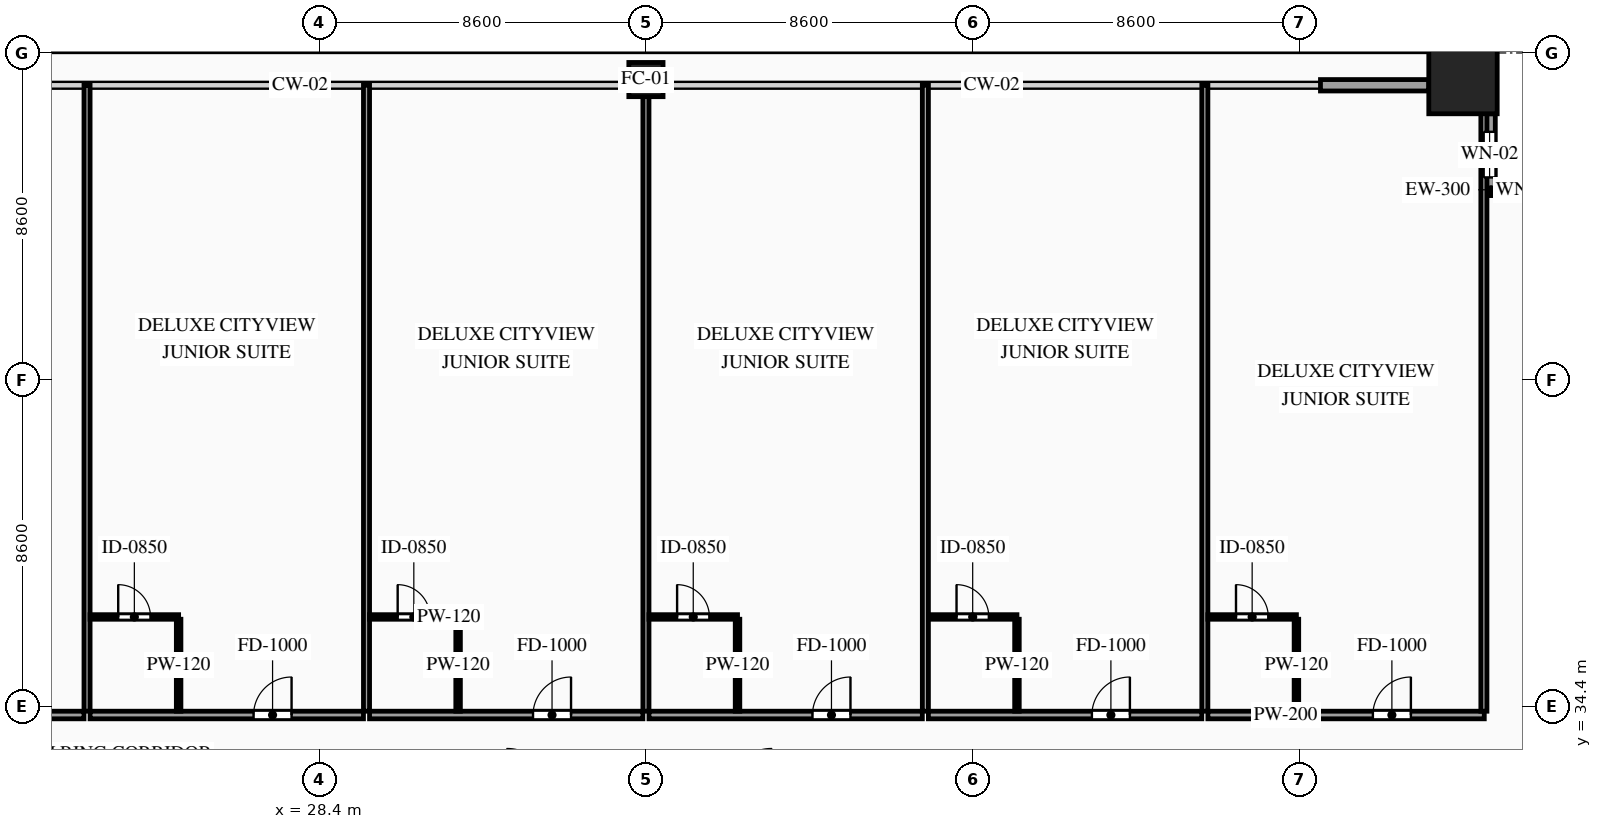
"""IFC4 building model, lengths in metres.
Left out: names, types, materials, properties, quantities, classifications, styles, units other than length and angle.
Written with IfcOpenShell. Run it as: python <this file> out.ifc"""

import sys

from ifc_helpers import new_model, si_unit, direction, frame, frame_2d, origin, origin_2d, place, context, subcontext, project, spatial, rectangle, hollow_rectangle, extrude, source, transform, mapped, element, fill, save


model = new_model("IFC4")
c1 = context("Model", 3, precision=1e-05, world=origin(), true_north=direction((0.0, 1.0)))
c2 = subcontext(c1, "Body", "Model", "MODEL_VIEW")
j1 = project(units=[si_unit("LENGTHUNIT", "METRE"), si_unit("PLANEANGLEUNIT", "RADIAN")], contexts=[c1])
p1 = place(None, origin())
s1 = spatial("IfcSite", under=j1, at=p1, CompositionType="ELEMENT")
p2 = place(p1, origin())
s2 = spatial("IfcBuilding", under=s1, at=p2, CompositionType="ELEMENT")
p3 = place(p2, frame((0.0, 0.0, 30.6)))
s3 = spatial("IfcBuildingStorey", under=s2, at=p3, CompositionType="ELEMENT", Elevation=30.6)
m1 = source(origin(), c2, "Body", "SweptSolid", [
    extrude(hollow_rectangle(XDim=0.9, YDim=0.9, WallThickness=0.042, at=origin_2d()), origin(), (0.0, 0.0, 1.0), 3.6),
])
p4 = place(p3, frame((37.0, 50.9, 0.0), z_axis=(0.0, 0.0, 1.0), x_axis=(1.0, 0.0, 0.0)))
e1 = element("IfcColumn", 1, at=p4, inside=s3, PredefinedType="COLUMN", context=c2, shape_type="MappedRepresentation", body=[
    mapped(m1, transform((0.0, 0.0, 0.0), scale=1.0)),
])
m2 = source(origin(), c2, "Body", "SweptSolid", [
    extrude(hollow_rectangle(XDim=1.8, YDim=1.8, WallThickness=0.08, at=origin_2d()), origin(), (0.0, 0.0, 1.0), 3.6),
])
p5 = place(p3, frame((58.5, 50.9, 0.0), z_axis=(0.0, 0.0, 1.0), x_axis=(1.0, 0.0, 0.0)))
e2 = element("IfcColumn", 2, at=p5, inside=s3, PredefinedType="COLUMN", context=c2, shape_type="MappedRepresentation", body=[
    mapped(m2, transform((0.0, 0.0, 0.0), scale=1.0)),
])
p6 = place(p3, frame((61.2, 48.0, 0.0), z_axis=(0.0, 0.0, 1.0), x_axis=(-1.0, 0.0, 0.0)))
e3 = element("IfcWall", 3, at=p6, inside=s3, PredefinedType="SOLIDWALL", context=c2, shape_type="SweptSolid", body=[
    extrude(rectangle(XDim=2.15, YDim=0.3, at=frame_2d((1.075, 0.0))), origin(), (0.0, 0.0, 1.0), 3.38),
])
p7 = place(p6, frame((0.625, 0.0, 0.85)))
e4 = element("IfcOpeningElement", 4, at=p7, cuts=e3, PredefinedType="OPENING", context=c2, shape_type="SweptSolid", body=[
    extrude(rectangle(XDim=0.9, YDim=1.5, at=frame_2d((0.45, 0.75))), frame((0.0, 0.165, 0.0), z_axis=(0.0, -1.0, 0.0), x_axis=(1.0, 0.0, 0.0)), (0.0, 0.0, 1.0), 0.33),
])
p8 = place(p3, frame((59.2, 47.85, 0.0), z_axis=(0.0, 0.0, 1.0), x_axis=(0.0, 1.0, 0.0)))
e5 = element("IfcWall", 5, at=p8, inside=s3, PredefinedType="SOLIDWALL", context=c2, shape_type="SweptSolid", body=[
    extrude(rectangle(XDim=2.15, YDim=0.3, at=frame_2d((1.075, 0.0))), origin(), (0.0, 0.0, 1.0), 3.38),
])
p9 = place(p8, frame((0.475, 0.0, 0.85)))
e6 = element("IfcOpeningElement", 6, at=p9, cuts=e5, PredefinedType="OPENING", context=c2, shape_type="SweptSolid", body=[
    extrude(rectangle(XDim=1.2, YDim=2.1, at=frame_2d((0.6, 1.05))), frame((0.0, 0.165, 0.0), z_axis=(0.0, -1.0, 0.0), x_axis=(1.0, 0.0, 0.0)), (0.0, 0.0, 1.0), 0.33),
])
m3 = source(origin(), c2, "Body", "SweptSolid", [
    extrude(rectangle(XDim=2.85, YDim=0.3, at=frame_2d((1.425, 0.0))), origin(), (0.0, 0.0, 1.0), 2.775),
])
p10 = place(p3, frame((54.75, 50.75, 0.0), z_axis=(0.0, 0.0, 1.0), x_axis=(1.0, 0.0, 0.0)))
e7 = element("IfcWall", 7, at=p10, inside=s3, PredefinedType="SOLIDWALL", context=c2, shape_type="MappedRepresentation", body=[
    mapped(m3, transform((0.0, 0.0, 0.0), scale=1.0)),
])
p11 = place(p3, frame((14.94, 34.18, 0.0), z_axis=(0.0, 0.0, 1.0), x_axis=(1.0, 0.0, 0.0)))
e8 = element("IfcWall", 8, at=p11, inside=s3, PredefinedType="PARTITIONING", context=c2, shape_type="SweptSolid", body=[
    extrude(rectangle(XDim=7.273, YDim=0.2, at=frame_2d((3.636, 0.0))), origin(), (0.0, 0.0, 1.0), 3.38),
])
p12 = place(p11, frame((4.342, 0.0, 0.0)))
e9 = element("IfcOpeningElement", 9, at=p12, cuts=e8, PredefinedType="OPENING", context=c2, shape_type="SweptSolid", body=[
    extrude(rectangle(XDim=1.0, YDim=2.2, at=frame_2d((0.5, 1.1))), frame((0.0, 0.115, 0.0), z_axis=(0.0, -1.0, 0.0), x_axis=(1.0, 0.0, 0.0)), (0.0, 0.0, 1.0), 0.23),
])
m4 = source(origin(), c2, "Body", "SweptSolid", [
    extrude(rectangle(XDim=16.47, YDim=0.16, at=frame_2d((8.235, 0.0))), origin(), (0.0, 0.0, 1.0), 3.38),
])
p13 = place(p3, frame((22.293, 34.28, 0.0), z_axis=(0.0, 0.0, 1.0), x_axis=(0.0, 1.0, 0.0)))
e10 = element("IfcWall", 10, at=p13, inside=s3, PredefinedType="PARTITIONING", context=c2, shape_type="MappedRepresentation", body=[
    mapped(m4, transform((0.0, 0.0, 0.0), scale=1.0)),
])
p14 = place(p3, frame((22.373, 34.18, 0.0), z_axis=(0.0, 0.0, 1.0), x_axis=(1.0, 0.0, 0.0)))
e11 = element("IfcWall", 11, at=p14, inside=s3, PredefinedType="PARTITIONING", context=c2, shape_type="SweptSolid", body=[
    extrude(rectangle(XDim=7.194, YDim=0.2, at=frame_2d((3.597, 0.0))), origin(), (0.0, 0.0, 1.0), 3.38),
])
p15 = place(p14, frame((4.302, 0.0, 0.0)))
e12 = element("IfcOpeningElement", 12, at=p15, cuts=e11, PredefinedType="OPENING", context=c2, shape_type="SweptSolid", body=[
    extrude(rectangle(XDim=1.0, YDim=2.2, at=frame_2d((0.5, 1.1))), frame((0.0, 0.115, 0.0), z_axis=(0.0, -1.0, 0.0), x_axis=(1.0, 0.0, 0.0)), (0.0, 0.0, 1.0), 0.23),
])
p16 = place(p3, frame((29.647, 34.28, 0.0), z_axis=(0.0, 0.0, 1.0), x_axis=(0.0, 1.0, 0.0)))
e13 = element("IfcWall", 13, at=p16, inside=s3, PredefinedType="PARTITIONING", context=c2, shape_type="MappedRepresentation", body=[
    mapped(m4, transform((0.0, 0.0, 0.0), scale=1.0)),
])
p17 = place(p3, frame((22.373, 36.76, 0.0), z_axis=(0.0, 0.0, 1.0), x_axis=(1.0, 0.0, 0.0)))
e14 = element("IfcWall", 14, at=p17, inside=s3, PredefinedType="PARTITIONING", context=c2, shape_type="SweptSolid", body=[
    extrude(rectangle(XDim=2.33, YDim=0.12, at=frame_2d((1.165, 0.0))), origin(), (0.0, 0.0, 1.0), 3.38),
])
p18 = place(p17, frame((0.74, 0.0, 0.0)))
e15 = element("IfcOpeningElement", 15, at=p18, cuts=e14, PredefinedType="OPENING", context=c2, shape_type="SweptSolid", body=[
    extrude(rectangle(XDim=0.85, YDim=2.1, at=frame_2d((0.425, 1.05))), frame((0.0, 0.075, 0.0), z_axis=(0.0, -1.0, 0.0), x_axis=(1.0, 0.0, 0.0)), (0.0, 0.0, 1.0), 0.15),
])
m5 = source(origin(), c2, "Body", "SweptSolid", [
    extrude(rectangle(XDim=2.42, YDim=0.12, at=frame_2d((1.21, 0.0))), origin(), (0.0, 0.0, 1.0), 3.38),
])
p19 = place(p3, frame((24.703, 34.28, 0.0), z_axis=(0.0, 0.0, 1.0), x_axis=(0.0, 1.0, 0.0)))
e16 = element("IfcWall", 16, at=p19, inside=s3, PredefinedType="PARTITIONING", context=c2, shape_type="MappedRepresentation", body=[
    mapped(m5, transform((0.0, 0.0, 0.0), scale=1.0)),
])
p20 = place(p3, frame((29.727, 34.18, 0.0), z_axis=(0.0, 0.0, 1.0), x_axis=(1.0, 0.0, 0.0)))
e17 = element("IfcWall", 17, at=p20, inside=s3, PredefinedType="PARTITIONING", context=c2, shape_type="SweptSolid", body=[
    extrude(rectangle(XDim=7.193, YDim=0.2, at=frame_2d((3.596, 0.0))), origin(), (0.0, 0.0, 1.0), 3.38),
])
p21 = place(p20, frame((4.302, 0.0, 0.0)))
e18 = element("IfcOpeningElement", 18, at=p21, cuts=e17, PredefinedType="OPENING", context=c2, shape_type="SweptSolid", body=[
    extrude(rectangle(XDim=1.0, YDim=2.2, at=frame_2d((0.5, 1.1))), frame((0.0, 0.115, 0.0), z_axis=(0.0, -1.0, 0.0), x_axis=(1.0, 0.0, 0.0)), (0.0, 0.0, 1.0), 0.23),
])
m6 = source(origin(), c2, "Body", "SweptSolid", [
    extrude(rectangle(XDim=16.47, YDim=0.16, at=frame_2d((8.235, 0.0))), origin(), (0.0, 0.0, 1.0), 2.575),
])
p22 = place(p3, frame((37.0, 34.28, 0.0), z_axis=(0.0, 0.0, 1.0), x_axis=(0.0, 1.0, 0.0)))
e19 = element("IfcWall", 19, at=p22, inside=s3, PredefinedType="PARTITIONING", context=c2, shape_type="MappedRepresentation", body=[
    mapped(m6, transform((0.0, 0.0, 0.0), scale=1.0)),
])
p23 = place(p3, frame((29.727, 36.76, 0.0), z_axis=(0.0, 0.0, 1.0), x_axis=(1.0, 0.0, 0.0)))
e20 = element("IfcWall", 20, at=p23, inside=s3, PredefinedType="PARTITIONING", context=c2, shape_type="SweptSolid", body=[
    extrude(rectangle(XDim=2.33, YDim=0.12, at=frame_2d((1.165, 0.0))), origin(), (0.0, 0.0, 1.0), 3.38),
])
p24 = place(p23, frame((0.74, 0.0, 0.0)))
e21 = element("IfcOpeningElement", 21, at=p24, cuts=e20, PredefinedType="OPENING", context=c2, shape_type="SweptSolid", body=[
    extrude(rectangle(XDim=0.85, YDim=2.1, at=frame_2d((0.425, 1.05))), frame((0.0, 0.075, 0.0), z_axis=(0.0, -1.0, 0.0), x_axis=(1.0, 0.0, 0.0)), (0.0, 0.0, 1.0), 0.15),
])
p25 = place(p3, frame((32.057, 34.28, 0.0), z_axis=(0.0, 0.0, 1.0), x_axis=(0.0, 1.0, 0.0)))
e22 = element("IfcWall", 22, at=p25, inside=s3, PredefinedType="PARTITIONING", context=c2, shape_type="MappedRepresentation", body=[
    mapped(m5, transform((0.0, 0.0, 0.0), scale=1.0)),
])
p26 = place(p3, frame((37.08, 34.18, 0.0), z_axis=(0.0, 0.0, 1.0), x_axis=(1.0, 0.0, 0.0)))
e23 = element("IfcWall", 23, at=p26, inside=s3, PredefinedType="PARTITIONING", context=c2, shape_type="SweptSolid", body=[
    extrude(rectangle(XDim=7.193, YDim=0.2, at=frame_2d((3.596, 0.0))), origin(), (0.0, 0.0, 1.0), 3.38),
])
p27 = place(p26, frame((4.302, 0.0, 0.0)))
e24 = element("IfcOpeningElement", 24, at=p27, cuts=e23, PredefinedType="OPENING", context=c2, shape_type="SweptSolid", body=[
    extrude(rectangle(XDim=1.0, YDim=2.2, at=frame_2d((0.5, 1.1))), frame((0.0, 0.115, 0.0), z_axis=(0.0, -1.0, 0.0), x_axis=(1.0, 0.0, 0.0)), (0.0, 0.0, 1.0), 0.23),
])
p28 = place(p3, frame((44.353, 34.28, 0.0), z_axis=(0.0, 0.0, 1.0), x_axis=(0.0, 1.0, 0.0)))
e25 = element("IfcWall", 25, at=p28, inside=s3, PredefinedType="PARTITIONING", context=c2, shape_type="MappedRepresentation", body=[
    mapped(m4, transform((0.0, 0.0, 0.0), scale=1.0)),
])
p29 = place(p3, frame((37.08, 36.76, 0.0), z_axis=(0.0, 0.0, 1.0), x_axis=(1.0, 0.0, 0.0)))
e26 = element("IfcWall", 26, at=p29, inside=s3, PredefinedType="PARTITIONING", context=c2, shape_type="SweptSolid", body=[
    extrude(rectangle(XDim=2.33, YDim=0.12, at=frame_2d((1.165, 0.0))), origin(), (0.0, 0.0, 1.0), 3.38),
])
p30 = place(p29, frame((0.74, 0.0, 0.0)))
e27 = element("IfcOpeningElement", 27, at=p30, cuts=e26, PredefinedType="OPENING", context=c2, shape_type="SweptSolid", body=[
    extrude(rectangle(XDim=0.85, YDim=2.1, at=frame_2d((0.425, 1.05))), frame((0.0, 0.075, 0.0), z_axis=(0.0, -1.0, 0.0), x_axis=(1.0, 0.0, 0.0)), (0.0, 0.0, 1.0), 0.15),
])
p31 = place(p3, frame((39.41, 34.28, 0.0), z_axis=(0.0, 0.0, 1.0), x_axis=(0.0, 1.0, 0.0)))
e28 = element("IfcWall", 28, at=p31, inside=s3, PredefinedType="PARTITIONING", context=c2, shape_type="MappedRepresentation", body=[
    mapped(m5, transform((0.0, 0.0, 0.0), scale=1.0)),
])
p32 = place(p3, frame((44.433, 34.18, 0.0), z_axis=(0.0, 0.0, 1.0), x_axis=(1.0, 0.0, 0.0)))
e29 = element("IfcWall", 29, at=p32, inside=s3, PredefinedType="PARTITIONING", context=c2, shape_type="SweptSolid", body=[
    extrude(rectangle(XDim=7.194, YDim=0.2, at=frame_2d((3.597, 0.0))), origin(), (0.0, 0.0, 1.0), 3.38),
])
p33 = place(p32, frame((4.302, 0.0, 0.0)))
e30 = element("IfcOpeningElement", 30, at=p33, cuts=e29, PredefinedType="OPENING", context=c2, shape_type="SweptSolid", body=[
    extrude(rectangle(XDim=1.0, YDim=2.2, at=frame_2d((0.5, 1.1))), frame((0.0, 0.115, 0.0), z_axis=(0.0, -1.0, 0.0), x_axis=(1.0, 0.0, 0.0)), (0.0, 0.0, 1.0), 0.23),
])
p34 = place(p3, frame((51.707, 34.28, 0.0), z_axis=(0.0, 0.0, 1.0), x_axis=(0.0, 1.0, 0.0)))
e31 = element("IfcWall", 31, at=p34, inside=s3, PredefinedType="PARTITIONING", context=c2, shape_type="MappedRepresentation", body=[
    mapped(m4, transform((0.0, 0.0, 0.0), scale=1.0)),
])
p35 = place(p3, frame((44.433, 36.76, 0.0), z_axis=(0.0, 0.0, 1.0), x_axis=(1.0, 0.0, 0.0)))
e32 = element("IfcWall", 32, at=p35, inside=s3, PredefinedType="PARTITIONING", context=c2, shape_type="SweptSolid", body=[
    extrude(rectangle(XDim=2.33, YDim=0.12, at=frame_2d((1.165, 0.0))), origin(), (0.0, 0.0, 1.0), 3.38),
])
p36 = place(p35, frame((0.74, 0.0, 0.0)))
e33 = element("IfcOpeningElement", 33, at=p36, cuts=e32, PredefinedType="OPENING", context=c2, shape_type="SweptSolid", body=[
    extrude(rectangle(XDim=0.85, YDim=2.1, at=frame_2d((0.425, 1.05))), frame((0.0, 0.075, 0.0), z_axis=(0.0, -1.0, 0.0), x_axis=(1.0, 0.0, 0.0)), (0.0, 0.0, 1.0), 0.15),
])
p37 = place(p3, frame((46.763, 34.28, 0.0), z_axis=(0.0, 0.0, 1.0), x_axis=(0.0, 1.0, 0.0)))
e34 = element("IfcWall", 34, at=p37, inside=s3, PredefinedType="PARTITIONING", context=c2, shape_type="MappedRepresentation", body=[
    mapped(m5, transform((0.0, 0.0, 0.0), scale=1.0)),
])
p38 = place(p3, frame((51.787, 34.18, 0.0), z_axis=(0.0, 0.0, 1.0), x_axis=(1.0, 0.0, 0.0)))
e35 = element("IfcWall", 35, at=p38, inside=s3, PredefinedType="PARTITIONING", context=c2, shape_type="SweptSolid", body=[
    extrude(rectangle(XDim=7.273, YDim=0.2, at=frame_2d((3.636, 0.0))), origin(), (0.0, 0.0, 1.0), 3.38),
])
p39 = place(p38, frame((4.342, 0.0, 0.0)))
e36 = element("IfcOpeningElement", 36, at=p39, cuts=e35, PredefinedType="OPENING", context=c2, shape_type="SweptSolid", body=[
    extrude(rectangle(XDim=1.0, YDim=2.2, at=frame_2d((0.5, 1.1))), frame((0.0, 0.115, 0.0), z_axis=(0.0, -1.0, 0.0), x_axis=(1.0, 0.0, 0.0)), (0.0, 0.0, 1.0), 0.23),
])
m7 = source(origin(), c2, "Body", "SweptSolid", [
    extrude(rectangle(XDim=16.32, YDim=0.16, at=frame_2d((8.16, 0.0))), origin(), (0.0, 0.0, 1.0), 3.38),
])
p40 = place(p3, frame((59.05, 34.28, 0.0), z_axis=(0.0, 0.0, 1.0), x_axis=(0.0, 1.0, 0.0)))
e37 = element("IfcWall", 37, at=p40, inside=s3, PredefinedType="PARTITIONING", context=c2, shape_type="MappedRepresentation", body=[
    mapped(m7, transform((0.0, 0.0, 0.0), scale=1.0)),
])
p41 = place(p3, frame((51.787, 36.76, 0.0), z_axis=(0.0, 0.0, 1.0), x_axis=(1.0, 0.0, 0.0)))
e38 = element("IfcWall", 38, at=p41, inside=s3, PredefinedType="PARTITIONING", context=c2, shape_type="SweptSolid", body=[
    extrude(rectangle(XDim=2.33, YDim=0.12, at=frame_2d((1.165, 0.0))), origin(), (0.0, 0.0, 1.0), 3.38),
])
p42 = place(p41, frame((0.74, 0.0, 0.0)))
e39 = element("IfcOpeningElement", 39, at=p42, cuts=e38, PredefinedType="OPENING", context=c2, shape_type="SweptSolid", body=[
    extrude(rectangle(XDim=0.85, YDim=2.1, at=frame_2d((0.425, 1.05))), frame((0.0, 0.075, 0.0), z_axis=(0.0, -1.0, 0.0), x_axis=(1.0, 0.0, 0.0)), (0.0, 0.0, 1.0), 0.15),
])
p43 = place(p3, frame((54.117, 34.28, 0.0), z_axis=(0.0, 0.0, 1.0), x_axis=(0.0, 1.0, 0.0)))
e40 = element("IfcWall", 40, at=p43, inside=s3, PredefinedType="PARTITIONING", context=c2, shape_type="MappedRepresentation", body=[
    mapped(m5, transform((0.0, 0.0, 0.0), scale=1.0)),
])
m8 = source(origin(), c2, "Body", "SweptSolid", [
    extrude(rectangle(XDim=0.9, YDim=1.5, at=frame_2d((0.45, 0.75))), frame((0.0, 0.03, 0.0), z_axis=(0.0, -1.0, 0.0), x_axis=(1.0, 0.0, 0.0)), (0.0, 0.0, 1.0), 0.06),
])
p44 = place(p7, origin())
e41 = element("IfcWindow", 41, at=p44, inside=s3, PartitioningType="SINGLE_PANEL", PredefinedType="WINDOW", context=c2, shape_type="MappedRepresentation", body=[
    mapped(m8, transform((0.0, 0.0, 0.0), scale=1.0)),
])
fill(e4, e41)
m9 = source(origin(), c2, "Body", "SweptSolid", [
    extrude(rectangle(XDim=1.2, YDim=2.1, at=frame_2d((0.6, 1.05))), frame((0.0, 0.03, 0.0), z_axis=(0.0, -1.0, 0.0), x_axis=(1.0, 0.0, 0.0)), (0.0, 0.0, 1.0), 0.06),
])
p45 = place(p9, origin())
e42 = element("IfcWindow", 42, at=p45, inside=s3, PartitioningType="SINGLE_PANEL", PredefinedType="WINDOW", context=c2, shape_type="MappedRepresentation", body=[
    mapped(m9, transform((0.0, 0.0, 0.0), scale=1.0)),
])
fill(e6, e42)
m10 = source(origin(), c2, "Body", "SweptSolid", [
    extrude(rectangle(XDim=1.0, YDim=2.2, at=frame_2d((0.5, 1.1))), frame((0.0, 0.025, 0.0), z_axis=(0.0, -1.0, 0.0), x_axis=(1.0, 0.0, 0.0)), (0.0, 0.0, 1.0), 0.05),
])
p46 = place(p15, origin())
e43 = element("IfcDoor", 43, at=p46, inside=s3, OperationType="SINGLE_SWING_RIGHT", PredefinedType="DOOR", context=c2, shape_type="MappedRepresentation", body=[
    mapped(m10, transform((0.0, 0.0, 0.0), scale=1.0)),
])
fill(e12, e43)
m11 = source(origin(), c2, "Body", "SweptSolid", [
    extrude(rectangle(XDim=0.85, YDim=2.1, at=frame_2d((0.425, 1.05))), frame((0.0, 0.025, 0.0), z_axis=(0.0, -1.0, 0.0), x_axis=(1.0, 0.0, 0.0)), (0.0, 0.0, 1.0), 0.05),
])
p47 = place(p18, origin())
e44 = element("IfcDoor", 44, at=p47, inside=s3, OperationType="SINGLE_SWING_LEFT", PredefinedType="DOOR", context=c2, shape_type="MappedRepresentation", body=[
    mapped(m11, transform((0.0, 0.0, 0.0), scale=1.0)),
])
fill(e15, e44)
p48 = place(p21, origin())
e45 = element("IfcDoor", 45, at=p48, inside=s3, OperationType="SINGLE_SWING_RIGHT", PredefinedType="DOOR", context=c2, shape_type="MappedRepresentation", body=[
    mapped(m10, transform((0.0, 0.0, 0.0), scale=1.0)),
])
fill(e18, e45)
p49 = place(p24, origin())
e46 = element("IfcDoor", 46, at=p49, inside=s3, OperationType="SINGLE_SWING_LEFT", PredefinedType="DOOR", context=c2, shape_type="MappedRepresentation", body=[
    mapped(m11, transform((0.0, 0.0, 0.0), scale=1.0)),
])
fill(e21, e46)
p50 = place(p27, origin())
e47 = element("IfcDoor", 47, at=p50, inside=s3, OperationType="SINGLE_SWING_RIGHT", PredefinedType="DOOR", context=c2, shape_type="MappedRepresentation", body=[
    mapped(m10, transform((0.0, 0.0, 0.0), scale=1.0)),
])
fill(e24, e47)
p51 = place(p30, origin())
e48 = element("IfcDoor", 48, at=p51, inside=s3, OperationType="SINGLE_SWING_LEFT", PredefinedType="DOOR", context=c2, shape_type="MappedRepresentation", body=[
    mapped(m11, transform((0.0, 0.0, 0.0), scale=1.0)),
])
fill(e27, e48)
p52 = place(p33, origin())
e49 = element("IfcDoor", 49, at=p52, inside=s3, OperationType="SINGLE_SWING_RIGHT", PredefinedType="DOOR", context=c2, shape_type="MappedRepresentation", body=[
    mapped(m10, transform((0.0, 0.0, 0.0), scale=1.0)),
])
fill(e30, e49)
p53 = place(p36, origin())
e50 = element("IfcDoor", 50, at=p53, inside=s3, OperationType="SINGLE_SWING_LEFT", PredefinedType="DOOR", context=c2, shape_type="MappedRepresentation", body=[
    mapped(m11, transform((0.0, 0.0, 0.0), scale=1.0)),
])
fill(e33, e50)
p54 = place(p39, origin())
e51 = element("IfcDoor", 51, at=p54, inside=s3, OperationType="SINGLE_SWING_RIGHT", PredefinedType="DOOR", context=c2, shape_type="MappedRepresentation", body=[
    mapped(m10, transform((0.0, 0.0, 0.0), scale=1.0)),
])
fill(e36, e51)
p55 = place(p42, origin())
e52 = element("IfcDoor", 52, at=p55, inside=s3, OperationType="SINGLE_SWING_LEFT", PredefinedType="DOOR", context=c2, shape_type="MappedRepresentation", body=[
    mapped(m11, transform((0.0, 0.0, 0.0), scale=1.0)),
])
fill(e39, e52)
save(model, sys.argv[1])
